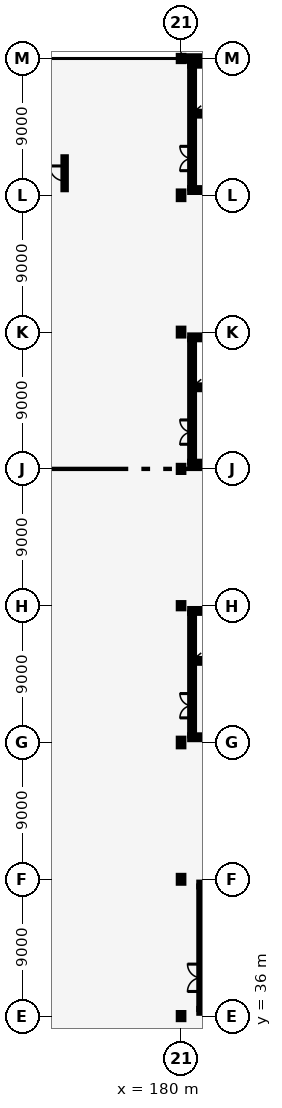
"""IFC4 building model, lengths in metres.
Left out: names, types, materials, properties, quantities, classifications, styles, units other than length and angle.
Written with IfcOpenShell. Run it as: python <this file> out.ifc"""

import sys

from ifc_helpers import new_model, si_unit, direction, frame, frame_2d, origin, origin_2d, place, context, subcontext, project, spatial, rectangle, i_section, extrude, element, fill, save


model = new_model("IFC4")
c1 = context("Model", 3, precision=1e-05, world=origin(), true_north=direction((0.0, 1.0)))
c2 = subcontext(c1, "Body", "Model", "MODEL_VIEW")
j1 = project(units=[si_unit("LENGTHUNIT", "METRE"), si_unit("PLANEANGLEUNIT", "RADIAN")], contexts=[c1])
p1 = place(None, origin())
s1 = spatial("IfcSite", under=j1, at=p1, CompositionType="ELEMENT")
p2 = place(p1, origin())
s2 = spatial("IfcBuilding", under=s1, at=p2, CompositionType="ELEMENT")
p3 = place(p2, frame((0.0, 0.0, 26.8)))
s3 = spatial("IfcBuildingStorey", under=s2, at=p3, CompositionType="ELEMENT", Elevation=26.8)
p4 = place(p3, frame((180.0, 36.0, 0.0), z_axis=(0.0, 0.0, 1.0), x_axis=(1.0, 0.0, 0.0)))
e1 = element("IfcColumn", 1, at=p4, inside=s3, PredefinedType="COLUMN", context=c2, shape_type="SweptSolid", body=[
    extrude(i_section(OverallWidth=0.3, OverallDepth=0.4, WebThickness=0.013, FlangeThickness=0.024, FilletRadius=0.027, at=origin_2d()), origin(), (0.0, 0.0, 1.0), 3.0),
])
p5 = place(p3, frame((180.0, 45.0, 0.0), z_axis=(0.0, 0.0, 1.0), x_axis=(1.0, 0.0, 0.0)))
e2 = element("IfcColumn", 2, at=p5, inside=s3, PredefinedType="COLUMN", context=c2, shape_type="SweptSolid", body=[
    extrude(i_section(OverallWidth=0.3, OverallDepth=0.45, WebThickness=0.014, FlangeThickness=0.026, FilletRadius=0.027, at=origin_2d()), origin(), (0.0, 0.0, 1.0), 3.0),
])
p6 = place(p3, frame((180.0, 54.0, 0.0), z_axis=(0.0, 0.0, 1.0), x_axis=(1.0, 0.0, 0.0)))
e3 = element("IfcColumn", 3, at=p6, inside=s3, PredefinedType="COLUMN", context=c2, shape_type="SweptSolid", body=[
    extrude(i_section(OverallWidth=0.3, OverallDepth=0.5, WebThickness=0.014, FlangeThickness=0.028, FilletRadius=0.027, at=origin_2d()), origin(), (0.0, 0.0, 1.0), 3.0),
])
p7 = place(p3, frame((180.0, 63.0, 0.0), z_axis=(0.0, 0.0, 1.0), x_axis=(1.0, 0.0, 0.0)))
e4 = element("IfcColumn", 4, at=p7, inside=s3, PredefinedType="COLUMN", context=c2, shape_type="SweptSolid", body=[
    extrude(i_section(OverallWidth=0.3, OverallDepth=0.34, WebThickness=0.012, FlangeThickness=0.021, FilletRadius=0.027, at=origin_2d()), origin(), (0.0, 0.0, 1.0), 3.0),
])
p8 = place(p3, frame((180.0, 72.0, 0.0), z_axis=(0.0, 0.0, 1.0), x_axis=(1.0, 0.0, 0.0)))
e5 = element("IfcColumn", 5, at=p8, inside=s3, PredefinedType="COLUMN", context=c2, shape_type="SweptSolid", body=[
    extrude(i_section(OverallWidth=0.3, OverallDepth=0.4, WebThickness=0.013, FlangeThickness=0.024, FilletRadius=0.027, at=origin_2d()), origin(), (0.0, 0.0, 1.0), 3.0),
])
p9 = place(p3, frame((180.0, 81.0, 0.0), z_axis=(0.0, 0.0, 1.0), x_axis=(1.0, 0.0, 0.0)))
e6 = element("IfcColumn", 6, at=p9, inside=s3, PredefinedType="COLUMN", context=c2, shape_type="SweptSolid", body=[
    extrude(i_section(OverallWidth=0.3, OverallDepth=0.45, WebThickness=0.014, FlangeThickness=0.026, FilletRadius=0.027, at=origin_2d()), origin(), (0.0, 0.0, 1.0), 3.0),
])
p10 = place(p3, frame((180.0, 90.0, 0.0), z_axis=(0.0, 0.0, 1.0), x_axis=(1.0, 0.0, 0.0)))
e7 = element("IfcColumn", 7, at=p10, inside=s3, PredefinedType="COLUMN", context=c2, shape_type="SweptSolid", body=[
    extrude(i_section(OverallWidth=0.3, OverallDepth=0.5, WebThickness=0.014, FlangeThickness=0.028, FilletRadius=0.027, at=origin_2d()), origin(), (0.0, 0.0, 1.0), 3.0),
])
p11 = place(p3, frame((180.0, 99.0, 0.0), z_axis=(0.0, 0.0, 1.0), x_axis=(1.0, 0.0, 0.0)))
e8 = element("IfcColumn", 8, at=p11, inside=s3, PredefinedType="COLUMN", context=c2, shape_type="SweptSolid", body=[
    extrude(i_section(OverallWidth=0.3, OverallDepth=0.34, WebThickness=0.012, FlangeThickness=0.021, FilletRadius=0.027, at=origin_2d()), origin(), (0.0, 0.0, 1.0), 3.0),
])
p12 = place(p3, frame((180.145, 99.0, 0.0), z_axis=(0.0, 0.0, 1.0), x_axis=(1.0, 0.0, 0.0)))
e9 = element("IfcWall", 9, at=p12, inside=s3, PredefinedType="SOLIDWALL", context=c2, shape_type="SweptSolid", body=[
    extrude(rectangle(XDim=11.71, YDim=0.29, at=frame_2d((5.855, 0.0))), origin(), (0.0, 0.0, 1.0), 1.9),
])
p13 = place(p3, frame((180.725, 54.47, 0.0), z_axis=(0.0, 0.0, 1.0), x_axis=(0.0, 1.0, 0.0)))
e10 = element("IfcWall", 10, at=p13, inside=s3, PredefinedType="SHEAR", context=c2, shape_type="SweptSolid", body=[
    extrude(rectangle(XDim=8.06, YDim=0.25, at=frame_2d((4.03, 0.0))), origin(), (0.0, 0.0, 1.0), 2.64),
])
p14 = place(p13, frame((1.15, 0.0, 0.0)))
e11 = element("IfcOpeningElement", 11, at=p14, cuts=e10, PredefinedType="OPENING", context=c2, shape_type="SweptSolid", body=[
    extrude(rectangle(XDim=1.6, YDim=2.2, at=frame_2d((0.8, 1.1))), frame((0.0, 0.135, 0.0), z_axis=(0.0, -1.0, 0.0), x_axis=(1.0, 0.0, 0.0)), (0.0, 0.0, 1.0), 0.27),
])
for number, where, z_axis, x_axis in (
    (12, (180.6, 54.345, 0.0), (0.0, 0.0, 1.0), (1.0, 0.0, 0.0)),
    (13, (180.6, 62.655, 0.0), (0.0, 0.0, 1.0), (1.0, 0.0, 0.0)),
):
    element("IfcWall", number, at=place(p3, frame(where, z_axis=z_axis, x_axis=x_axis)), inside=s3, PredefinedType="SHEAR", context=c2, shape_type="SweptSolid", body=[
        extrude(rectangle(XDim=7.8, YDim=0.25, at=frame_2d((3.9, 0.0))), origin(), (0.0, 0.0, 1.0), 2.64),
    ])
p15 = place(p3, frame((180.85, 59.37, 0.0), z_axis=(0.0, 0.0, 1.0), x_axis=(1.0, 0.0, 0.0)))
e14 = element("IfcWall", 14, at=p15, inside=s3, PredefinedType="SHEAR", context=c2, shape_type="SweptSolid", body=[
    extrude(rectangle(XDim=3.61, YDim=0.25, at=frame_2d((1.805, 0.0))), origin(), (0.0, 0.0, 1.0), 2.64),
])
p16 = place(p15, frame((1.0, 0.0, 0.0)))
e15 = element("IfcOpeningElement", 15, at=p16, cuts=e14, PredefinedType="OPENING", context=c2, shape_type="SweptSolid", body=[
    extrude(rectangle(XDim=1.1, YDim=2.1, at=frame_2d((0.55, 1.05))), frame((0.0, 0.135, 0.0), z_axis=(0.0, -1.0, 0.0), x_axis=(1.0, 0.0, 0.0)), (0.0, 0.0, 1.0), 0.27),
])
p17 = place(p3, frame((181.325, 36.47, 0.0), z_axis=(0.0, 0.0, 1.0), x_axis=(0.0, 1.0, 0.0)))
e16 = element("IfcWall", 16, at=p17, inside=s3, PredefinedType="SHEAR", context=c2, shape_type="SweptSolid", body=[
    extrude(rectangle(XDim=8.06, YDim=0.25, at=frame_2d((4.03, 0.0))), origin(), (0.0, 0.0, 1.0), 2.64),
])
p18 = place(p17, frame((1.15, 0.0, 0.0)))
e17 = element("IfcOpeningElement", 17, at=p18, cuts=e16, PredefinedType="OPENING", context=c2, shape_type="SweptSolid", body=[
    extrude(rectangle(XDim=1.8, YDim=2.2, at=frame_2d((0.9, 1.1))), frame((0.0, 0.135, 0.0), z_axis=(0.0, -1.0, 0.0), x_axis=(1.0, 0.0, 0.0)), (0.0, 0.0, 1.0), 0.27),
])
for number, where, z_axis, x_axis in (
    (18, (181.2, 36.345, 0.0), (0.0, 0.0, 1.0), (1.0, 0.0, 0.0)),
    (19, (181.2, 44.655, 0.0), (0.0, 0.0, 1.0), (1.0, 0.0, 0.0)),
):
    element("IfcWall", number, at=place(p3, frame(where, z_axis=z_axis, x_axis=x_axis)), inside=s3, PredefinedType="SHEAR", context=c2, shape_type="SweptSolid", body=[
        extrude(rectangle(XDim=7.8, YDim=0.25, at=frame_2d((3.9, 0.0))), origin(), (0.0, 0.0, 1.0), 2.64),
    ])
p19 = place(p3, frame((180.725, 72.47, 0.0), z_axis=(0.0, 0.0, 1.0), x_axis=(0.0, 1.0, 0.0)))
e20 = element("IfcWall", 20, at=p19, inside=s3, PredefinedType="SHEAR", context=c2, shape_type="SweptSolid", body=[
    extrude(rectangle(XDim=8.06, YDim=0.25, at=frame_2d((4.03, 0.0))), origin(), (0.0, 0.0, 1.0), 2.64),
])
p20 = place(p19, frame((1.15, 0.0, 0.0)))
e21 = element("IfcOpeningElement", 21, at=p20, cuts=e20, PredefinedType="OPENING", context=c2, shape_type="SweptSolid", body=[
    extrude(rectangle(XDim=1.6, YDim=2.2, at=frame_2d((0.8, 1.1))), frame((0.0, 0.135, 0.0), z_axis=(0.0, -1.0, 0.0), x_axis=(1.0, 0.0, 0.0)), (0.0, 0.0, 1.0), 0.27),
])
for number, where, z_axis, x_axis in (
    (22, (180.6, 72.345, 0.0), (0.0, 0.0, 1.0), (1.0, 0.0, 0.0)),
    (23, (180.6, 80.655, 0.0), (0.0, 0.0, 1.0), (1.0, 0.0, 0.0)),
):
    element("IfcWall", number, at=place(p3, frame(where, z_axis=z_axis, x_axis=x_axis)), inside=s3, PredefinedType="SHEAR", context=c2, shape_type="SweptSolid", body=[
        extrude(rectangle(XDim=7.8, YDim=0.25, at=frame_2d((3.9, 0.0))), origin(), (0.0, 0.0, 1.0), 2.64),
    ])
p21 = place(p3, frame((180.85, 77.37, 0.0), z_axis=(0.0, 0.0, 1.0), x_axis=(1.0, 0.0, 0.0)))
e24 = element("IfcWall", 24, at=p21, inside=s3, PredefinedType="SHEAR", context=c2, shape_type="SweptSolid", body=[
    extrude(rectangle(XDim=3.61, YDim=0.25, at=frame_2d((1.805, 0.0))), origin(), (0.0, 0.0, 1.0), 2.64),
])
p22 = place(p21, frame((1.0, 0.0, 0.0)))
e25 = element("IfcOpeningElement", 25, at=p22, cuts=e24, PredefinedType="OPENING", context=c2, shape_type="SweptSolid", body=[
    extrude(rectangle(XDim=1.1, YDim=2.1, at=frame_2d((0.55, 1.05))), frame((0.0, 0.135, 0.0), z_axis=(0.0, -1.0, 0.0), x_axis=(1.0, 0.0, 0.0)), (0.0, 0.0, 1.0), 0.27),
])
p23 = place(p3, frame((180.725, 90.47, 0.0), z_axis=(0.0, 0.0, 1.0), x_axis=(0.0, 1.0, 0.0)))
e26 = element("IfcWall", 26, at=p23, inside=s3, PredefinedType="SHEAR", context=c2, shape_type="SweptSolid", body=[
    extrude(rectangle(XDim=8.06, YDim=0.25, at=frame_2d((4.03, 0.0))), origin(), (0.0, 0.0, 1.0), 2.64),
])
p24 = place(p23, frame((1.15, 0.0, 0.0)))
e27 = element("IfcOpeningElement", 27, at=p24, cuts=e26, PredefinedType="OPENING", context=c2, shape_type="SweptSolid", body=[
    extrude(rectangle(XDim=1.6, YDim=2.2, at=frame_2d((0.8, 1.1))), frame((0.0, 0.135, 0.0), z_axis=(0.0, -1.0, 0.0), x_axis=(1.0, 0.0, 0.0)), (0.0, 0.0, 1.0), 0.27),
])
for number, where, z_axis, x_axis in (
    (28, (180.6, 90.345, 0.0), (0.0, 0.0, 1.0), (1.0, 0.0, 0.0)),
    (29, (180.6, 98.655, 0.0), (0.0, 0.0, 1.0), (1.0, 0.0, 0.0)),
):
    element("IfcWall", number, at=place(p3, frame(where, z_axis=z_axis, x_axis=x_axis)), inside=s3, PredefinedType="SHEAR", context=c2, shape_type="SweptSolid", body=[
        extrude(rectangle(XDim=7.8, YDim=0.25, at=frame_2d((3.9, 0.0))), origin(), (0.0, 0.0, 1.0), 2.64),
    ])
p25 = place(p3, frame((180.85, 95.37, 0.0), z_axis=(0.0, 0.0, 1.0), x_axis=(1.0, 0.0, 0.0)))
e30 = element("IfcWall", 30, at=p25, inside=s3, PredefinedType="SHEAR", context=c2, shape_type="SweptSolid", body=[
    extrude(rectangle(XDim=3.61, YDim=0.25, at=frame_2d((1.805, 0.0))), origin(), (0.0, 0.0, 1.0), 2.64),
])
p26 = place(p25, frame((1.0, 0.0, 0.0)))
e31 = element("IfcOpeningElement", 31, at=p26, cuts=e30, PredefinedType="OPENING", context=c2, shape_type="SweptSolid", body=[
    extrude(rectangle(XDim=1.1, YDim=2.1, at=frame_2d((0.55, 1.05))), frame((0.0, 0.135, 0.0), z_axis=(0.0, -1.0, 0.0), x_axis=(1.0, 0.0, 0.0)), (0.0, 0.0, 1.0), 0.27),
])
p27 = place(p3, frame((172.34, 90.4, 0.0), z_axis=(0.0, 0.0, 1.0), x_axis=(0.0, 1.0, 0.0)))
e32 = element("IfcWall", 32, at=p27, inside=s3, PredefinedType="PARTITIONING", context=c2, shape_type="SweptSolid", body=[
    extrude(rectangle(XDim=2.1, YDim=0.155, at=frame_2d((1.05, 0.0))), origin(), (0.0, 0.0, 1.0), 2.35),
])
p28 = place(p27, frame((0.55, 0.0, 0.0)))
e33 = element("IfcOpeningElement", 33, at=p28, cuts=e32, PredefinedType="OPENING", context=c2, shape_type="SweptSolid", body=[
    extrude(rectangle(XDim=0.98, YDim=2.12, at=frame_2d((0.49, 1.06))), frame((0.0, 0.087, 0.0), z_axis=(0.0, -1.0, 0.0), x_axis=(1.0, 0.0, 0.0)), (0.0, 0.0, 1.0), 0.175),
])
p29 = place(p14, origin())
e34 = element("IfcDoor", 34, at=p29, inside=s3, OperationType="DOUBLE_DOOR_SINGLE_SWING", PredefinedType="DOOR", context=c2, shape_type="SweptSolid", body=[
    extrude(rectangle(XDim=1.6, YDim=2.2, at=frame_2d((0.8, 1.1))), frame((0.0, 0.025, 0.0), z_axis=(0.0, -1.0, 0.0), x_axis=(1.0, 0.0, 0.0)), (0.0, 0.0, 1.0), 0.05),
])
fill(e11, e34)
p30 = place(p18, origin())
e35 = element("IfcDoor", 35, at=p30, inside=s3, OperationType="DOUBLE_DOOR_SINGLE_SWING", PredefinedType="DOOR", context=c2, shape_type="SweptSolid", body=[
    extrude(rectangle(XDim=1.8, YDim=2.2, at=frame_2d((0.9, 1.1))), frame((0.0, 0.025, 0.0), z_axis=(0.0, -1.0, 0.0), x_axis=(1.0, 0.0, 0.0)), (0.0, 0.0, 1.0), 0.05),
])
fill(e17, e35)
p31 = place(p20, origin())
e36 = element("IfcDoor", 36, at=p31, inside=s3, OperationType="DOUBLE_DOOR_SINGLE_SWING", PredefinedType="DOOR", context=c2, shape_type="SweptSolid", body=[
    extrude(rectangle(XDim=1.6, YDim=2.2, at=frame_2d((0.8, 1.1))), frame((0.0, 0.025, 0.0), z_axis=(0.0, -1.0, 0.0), x_axis=(1.0, 0.0, 0.0)), (0.0, 0.0, 1.0), 0.05),
])
fill(e21, e36)
p32 = place(p24, origin())
e37 = element("IfcDoor", 37, at=p32, inside=s3, OperationType="DOUBLE_DOOR_SINGLE_SWING", PredefinedType="DOOR", context=c2, shape_type="SweptSolid", body=[
    extrude(rectangle(XDim=1.6, YDim=2.2, at=frame_2d((0.8, 1.1))), frame((0.0, 0.025, 0.0), z_axis=(0.0, -1.0, 0.0), x_axis=(1.0, 0.0, 0.0)), (0.0, 0.0, 1.0), 0.05),
])
fill(e27, e37)
p33 = place(p28, origin())
e38 = element("IfcDoor", 38, at=p33, inside=s3, OperationType="SINGLE_SWING_RIGHT", PredefinedType="DOOR", context=c2, shape_type="SweptSolid", body=[
    extrude(rectangle(XDim=0.98, YDim=2.12, at=frame_2d((0.49, 1.06))), frame((0.0, 0.025, 0.0), z_axis=(0.0, -1.0, 0.0), x_axis=(1.0, 0.0, 0.0)), (0.0, 0.0, 1.0), 0.05),
])
fill(e33, e38)
save(model, sys.argv[1])
